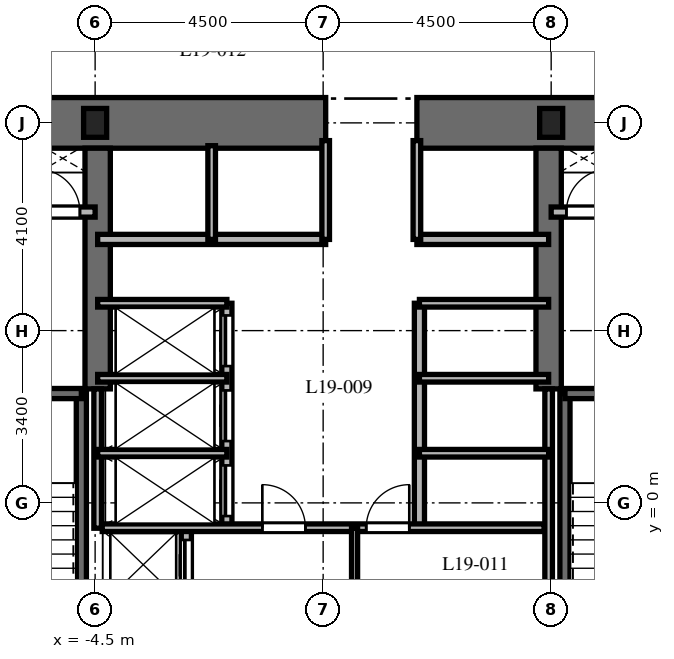
"""IFC4 building model, lengths in metres.
Left out: names, types, materials, properties, quantities, classifications, styles, units other than length and angle.
Written with IfcOpenShell. Run it as: python <this file> out.ifc"""

import sys

from ifc_helpers import new_model, si_unit, direction, frame, frame_2d, origin, origin_2d, place, context, subcontext, project, spatial, rectangle, i_section, extrude, element, fill, save


model = new_model("IFC4")
c1 = context("Model", 3, precision=1e-05, world=origin(), true_north=direction((0.0, 1.0)))
c2 = subcontext(c1, "Body", "Model", "MODEL_VIEW")
j1 = project(units=[si_unit("LENGTHUNIT", "METRE"), si_unit("PLANEANGLEUNIT", "RADIAN")], contexts=[c1])
p1 = place(None, origin())
s1 = spatial("IfcSite", under=j1, at=p1, CompositionType="ELEMENT")
p2 = place(p1, origin())
s2 = spatial("IfcBuilding", under=s1, at=p2, CompositionType="ELEMENT")
p3 = place(p2, frame((0.0, 0.0, 82.3)))
s3 = spatial("IfcBuildingStorey", under=s2, at=p3, CompositionType="ELEMENT", Elevation=82.3)
p4 = place(p3, frame((-9.5, 7.5, 0.0), z_axis=(0.0, 0.0, 1.0), x_axis=(1.0, 0.0, 0.0)))
e1 = element("IfcWall", 1, at=p4, inside=s3, PredefinedType="SHEAR", context=c2, shape_type="SweptSolid", body=[
    extrude(rectangle(XDim=9.55, YDim=1.0, at=frame_2d((4.775, 0.0))), origin(), (0.0, 0.0, 1.0), 3.7),
])
p5 = place(p3, frame((1.85, 7.5, 0.0), z_axis=(0.0, 0.0, 1.0), x_axis=(1.0, 0.0, 0.0)))
e2 = element("IfcWall", 2, at=p5, inside=s3, PredefinedType="SHEAR", context=c2, shape_type="SweptSolid", body=[
    extrude(rectangle(XDim=7.65, YDim=1.0, at=frame_2d((3.825, 0.0))), origin(), (0.0, 0.0, 1.0), 3.7),
])
for number, where, z_axis, x_axis in (
    (3, (-4.45, 2.25, 0.0), (0.0, 0.0, 1.0), (0.0, 1.0, 0.0)),
    (4, (4.45, 2.25, 0.0), (0.0, 0.0, 1.0), (0.0, 1.0, 0.0)),
):
    element("IfcWall", number, at=place(p3, frame(where, z_axis=z_axis, x_axis=x_axis)), inside=s3, PredefinedType="SHEAR", context=c2, shape_type="SweptSolid", body=[
        extrude(rectangle(XDim=4.75, YDim=0.5, at=frame_2d((2.375, 0.0))), origin(), (0.0, 0.0, 1.0), 3.7),
    ])
p6 = place(p3, frame((-4.772, -6.985, 0.0), z_axis=(0.0, 0.0, 1.0), x_axis=(0.0, 1.0, 0.0)))
e5 = element("IfcWall", 5, at=p6, inside=s3, PredefinedType="SHEAR", context=c2, shape_type="SweptSolid", body=[
    extrude(rectangle(XDim=9.143, YDim=0.2, at=frame_2d((4.572, 0.0))), origin(), (0.0, 0.0, 1.0), 3.7),
])
p7 = place(p3, frame((-8.458, 2.158, 0.0), z_axis=(0.0, 0.0, 1.0), x_axis=(1.0, 0.0, 0.0)))
e6 = element("IfcWall", 6, at=p7, inside=s3, PredefinedType="SHEAR", context=c2, shape_type="SweptSolid", body=[
    extrude(rectangle(XDim=3.686, YDim=0.2, at=frame_2d((1.843, 0.0))), origin(), (0.0, 0.0, 1.0), 3.7),
])
p8 = place(p7, frame((1.3, 0.0, 0.0)))
e7 = element("IfcOpeningElement", 7, at=p8, cuts=e6, PredefinedType="OPENING", context=c2, shape_type="SweptSolid", body=[
    extrude(rectangle(XDim=1.0, YDim=2.15, at=frame_2d((0.5, 1.075))), frame((0.0, 0.11, 0.0), z_axis=(0.0, -1.0, 0.0), x_axis=(1.0, 0.0, 0.0)), (0.0, 0.0, 1.0), 0.22),
])
p9 = place(p3, frame((4.772, -6.985, 0.0), z_axis=(0.0, 0.0, 1.0), x_axis=(0.0, 1.0, 0.0)))
e8 = element("IfcWall", 8, at=p9, inside=s3, PredefinedType="SHEAR", context=c2, shape_type="SweptSolid", body=[
    extrude(rectangle(XDim=9.143, YDim=0.2, at=frame_2d((4.572, 0.0))), origin(), (0.0, 0.0, 1.0), 3.7),
])
p10 = place(p3, frame((4.772, 2.158, 0.0), z_axis=(0.0, 0.0, 1.0), x_axis=(1.0, 0.0, 0.0)))
e9 = element("IfcWall", 9, at=p10, inside=s3, PredefinedType="SHEAR", context=c2, shape_type="SweptSolid", body=[
    extrude(rectangle(XDim=3.686, YDim=0.2, at=frame_2d((1.843, 0.0))), origin(), (0.0, 0.0, 1.0), 3.7),
])
p11 = place(p10, frame((1.35, 0.0, 0.0)))
e10 = element("IfcOpeningElement", 10, at=p11, cuts=e9, PredefinedType="OPENING", context=c2, shape_type="SweptSolid", body=[
    extrude(rectangle(XDim=1.0, YDim=2.15, at=frame_2d((0.5, 1.075))), frame((0.0, 0.11, 0.0), z_axis=(0.0, -1.0, 0.0), x_axis=(1.0, 0.0, 0.0)), (0.0, 0.0, 1.0), 0.22),
])
for number, where, z_axis, x_axis in (
    (11, (4.5, 7.5, 0.0), (0.0, 0.0, 1.0), (1.0, 0.0, 0.0)),
    (12, (-4.5, 7.5, 0.0), (0.0, 0.0, 1.0), (1.0, 0.0, 0.0)),
):
    element("IfcColumn", number, at=place(p3, frame(where, z_axis=z_axis, x_axis=x_axis)), inside=s3, PredefinedType="COLUMN", context=c2, shape_type="SweptSolid", body=[
        extrude(i_section(OverallWidth=0.454, OverallDepth=0.569, WebThickness=0.078, FlangeThickness=0.125, at=origin_2d()), origin(), (0.0, 0.0, 1.0), 3.7),
    ])
p12 = place(p3, frame((-8.55, 5.74, 0.0), z_axis=(0.0, 0.0, 1.0), x_axis=(1.0, 0.0, 0.0)))
e13 = element("IfcWall", 13, at=p12, inside=s3, PredefinedType="PARTITIONING", context=c2, shape_type="SweptSolid", body=[
    extrude(rectangle(XDim=4.05, YDim=0.2, at=frame_2d((2.025, 0.0))), origin(), (0.0, 0.0, 1.0), 3.38),
])
p13 = place(p12, frame((0.75, 0.0, 0.0)))
e14 = element("IfcOpeningElement", 14, at=p13, cuts=e13, PredefinedType="OPENING", context=c2, shape_type="SweptSolid", body=[
    extrude(rectangle(XDim=1.1, YDim=2.2, at=frame_2d((0.55, 1.1))), frame((0.0, 0.11, 0.0), z_axis=(0.0, -1.0, 0.0), x_axis=(1.0, 0.0, 0.0)), (0.0, 0.0, 1.0), 0.22),
])
p14 = place(p12, frame((2.9, 0.0, 0.0)))
e15 = element("IfcOpeningElement", 15, at=p14, cuts=e13, PredefinedType="OPENING", context=c2, shape_type="SweptSolid", body=[
    extrude(rectangle(XDim=0.85, YDim=2.03, at=frame_2d((0.425, 1.015))), frame((0.0, 0.11, 0.0), z_axis=(0.0, -1.0, 0.0), x_axis=(1.0, 0.0, 0.0)), (0.0, 0.0, 1.0), 0.22),
])
p15 = place(p3, frame((4.5, 5.74, 0.0), z_axis=(0.0, 0.0, 1.0), x_axis=(1.0, 0.0, 0.0)))
e16 = element("IfcWall", 16, at=p15, inside=s3, PredefinedType="PARTITIONING", context=c2, shape_type="SweptSolid", body=[
    extrude(rectangle(XDim=4.05, YDim=0.2, at=frame_2d((2.025, 0.0))), origin(), (0.0, 0.0, 1.0), 3.38),
])
p16 = place(p15, frame((0.3, 0.0, 0.0)))
e17 = element("IfcOpeningElement", 17, at=p16, cuts=e16, PredefinedType="OPENING", context=c2, shape_type="SweptSolid", body=[
    extrude(rectangle(XDim=0.85, YDim=2.03, at=frame_2d((0.425, 1.015))), frame((0.0, 0.11, 0.0), z_axis=(0.0, -1.0, 0.0), x_axis=(1.0, 0.0, 0.0)), (0.0, 0.0, 1.0), 0.22),
])
p17 = place(p15, frame((2.15, 0.0, 0.0)))
e18 = element("IfcOpeningElement", 18, at=p17, cuts=e16, PredefinedType="OPENING", context=c2, shape_type="SweptSolid", body=[
    extrude(rectangle(XDim=1.1, YDim=2.2, at=frame_2d((0.55, 1.1))), frame((0.0, 0.11, 0.0), z_axis=(0.0, -1.0, 0.0), x_axis=(1.0, 0.0, 0.0)), (0.0, 0.0, 1.0), 0.22),
])
p18 = place(p3, frame((-2.7, -1.972, 0.0), z_axis=(0.0, 0.0, 1.0), x_axis=(0.0, 1.0, 0.0)))
e19 = element("IfcWall", 19, at=p18, inside=s3, PredefinedType="PARTITIONING", context=c2, shape_type="SweptSolid", body=[
    extrude(rectangle(XDim=1.472, YDim=0.2, at=frame_2d((0.736, 0.0))), origin(), (0.0, 0.0, 1.0), 3.38),
])
p19 = place(p18, frame((0.24, 0.0, 0.0)))
e20 = element("IfcOpeningElement", 20, at=p19, cuts=e19, PredefinedType="OPENING", context=c2, shape_type="SweptSolid", body=[
    extrude(rectangle(XDim=1.0, YDim=2.2, at=frame_2d((0.5, 1.1))), frame((0.0, 0.11, 0.0), z_axis=(0.0, -1.0, 0.0), x_axis=(1.0, 0.0, 0.0)), (0.0, 0.0, 1.0), 0.22),
])
p20 = place(p3, frame((-4.45, 5.2, 0.0), z_axis=(0.0, 0.0, 1.0), x_axis=(1.0, 0.0, 0.0)))
e21 = element("IfcWall", 21, at=p20, inside=s3, PredefinedType="PARTITIONING", context=c2, shape_type="SweptSolid", body=[
    extrude(rectangle(XDim=4.5, YDim=0.2, at=frame_2d((2.25, 0.0))), origin(), (0.0, 0.0, 1.0), 3.38),
])
p21 = place(p3, frame((1.85, 5.2, 0.0), z_axis=(0.0, 0.0, 1.0), x_axis=(1.0, 0.0, 0.0)))
e22 = element("IfcWall", 22, at=p21, inside=s3, PredefinedType="PARTITIONING", context=c2, shape_type="SweptSolid", body=[
    extrude(rectangle(XDim=2.6, YDim=0.2, at=frame_2d((1.3, 0.0))), origin(), (0.0, 0.0, 1.0), 3.38),
])
p22 = place(p3, frame((-2.2, 5.2, 0.0), z_axis=(0.0, 0.0, 1.0), x_axis=(0.0, 1.0, 0.0)))
e23 = element("IfcWall", 23, at=p22, inside=s3, PredefinedType="PARTITIONING", context=c2, shape_type="SweptSolid", body=[
    extrude(rectangle(XDim=1.85, YDim=0.15, at=frame_2d((0.925, 0.0))), origin(), (0.0, 0.0, 1.0), 3.38),
])
for number, where, z_axis, x_axis in (
    (24, (0.05, 5.2, 0.0), (0.0, 0.0, 1.0), (0.0, 1.0, 0.0)),
    (25, (1.85, 5.2, 0.0), (0.0, 0.0, 1.0), (0.0, 1.0, 0.0)),
):
    element("IfcWall", number, at=place(p3, frame(where, z_axis=z_axis, x_axis=x_axis)), inside=s3, PredefinedType="PARTITIONING", context=c2, shape_type="SweptSolid", body=[
        extrude(rectangle(XDim=1.95, YDim=0.15, at=frame_2d((0.975, 0.0))), origin(), (0.0, 0.0, 1.0), 3.38),
    ])
p23 = place(p3, frame((-4.45, -0.5, 0.0), z_axis=(0.0, 0.0, 1.0), x_axis=(0.0, 1.0, 0.0)))
e26 = element("IfcWall", 26, at=p23, inside=s3, PredefinedType="PARTITIONING", context=c2, shape_type="SweptSolid", body=[
    extrude(rectangle(XDim=2.75, YDim=0.15, at=frame_2d((1.375, 0.0))), origin(), (0.0, 0.0, 1.0), 3.38),
])
p24 = place(p3, frame((4.45, -1.972, 0.0), z_axis=(0.0, 0.0, 1.0), x_axis=(0.0, 1.0, 0.0)))
e27 = element("IfcWall", 27, at=p24, inside=s3, PredefinedType="PARTITIONING", context=c2, shape_type="SweptSolid", body=[
    extrude(rectangle(XDim=4.222, YDim=0.15, at=frame_2d((2.111, 0.0))), origin(), (0.0, 0.0, 1.0), 3.38),
])
p25 = place(p3, frame((-1.9, -0.5, 0.0), z_axis=(0.0, 0.0, 1.0), x_axis=(0.0, 1.0, 0.0)))
e28 = element("IfcWall", 28, at=p25, inside=s3, PredefinedType="PARTITIONING", context=c2, shape_type="SweptSolid", body=[
    extrude(rectangle(XDim=4.44, YDim=0.2, at=frame_2d((2.22, 0.0))), origin(), (0.0, 0.0, 1.0), 3.38),
])
p26 = place(p25, frame((0.24, 0.0, 0.0)))
e29 = element("IfcOpeningElement", 29, at=p26, cuts=e28, PredefinedType="OPENING", context=c2, shape_type="SweptSolid", body=[
    extrude(rectangle(XDim=1.0, YDim=2.2, at=frame_2d((0.5, 1.1))), frame((0.0, 0.11, 0.0), z_axis=(0.0, -1.0, 0.0), x_axis=(1.0, 0.0, 0.0)), (0.0, 0.0, 1.0), 0.22),
])
p27 = place(p25, frame((1.72, 0.0, 0.0)))
e30 = element("IfcOpeningElement", 30, at=p27, cuts=e28, PredefinedType="OPENING", context=c2, shape_type="SweptSolid", body=[
    extrude(rectangle(XDim=1.0, YDim=2.2, at=frame_2d((0.5, 1.1))), frame((0.0, 0.11, 0.0), z_axis=(0.0, -1.0, 0.0), x_axis=(1.0, 0.0, 0.0)), (0.0, 0.0, 1.0), 0.22),
])
p28 = place(p25, frame((3.2, 0.0, 0.0)))
e31 = element("IfcOpeningElement", 31, at=p28, cuts=e28, PredefinedType="OPENING", context=c2, shape_type="SweptSolid", body=[
    extrude(rectangle(XDim=1.0, YDim=2.2, at=frame_2d((0.5, 1.1))), frame((0.0, 0.11, 0.0), z_axis=(0.0, -1.0, 0.0), x_axis=(1.0, 0.0, 0.0)), (0.0, 0.0, 1.0), 0.22),
])
for number, where, z_axis, x_axis in (
    (32, (-4.45, 3.94, 0.0), (0.0, 0.0, 1.0), (1.0, 0.0, 0.0)),
    (33, (-4.45, 0.98, 0.0), (0.0, 0.0, 1.0), (1.0, 0.0, 0.0)),
    (34, (-4.45, 2.46, 0.0), (0.0, 0.0, 1.0), (1.0, 0.0, 0.0)),
):
    element("IfcWall", number, at=place(p3, frame(where, z_axis=z_axis, x_axis=x_axis)), inside=s3, PredefinedType="PARTITIONING", context=c2, shape_type="SweptSolid", body=[
        extrude(rectangle(XDim=2.55, YDim=0.15, at=frame_2d((1.275, 0.0))), origin(), (0.0, 0.0, 1.0), 3.38),
    ])
p29 = place(p3, frame((1.9, -0.5, 0.0), z_axis=(0.0, 0.0, 1.0), x_axis=(0.0, 1.0, 0.0)))
e35 = element("IfcWall", 35, at=p29, inside=s3, PredefinedType="PARTITIONING", context=c2, shape_type="SweptSolid", body=[
    extrude(rectangle(XDim=4.44, YDim=0.2, at=frame_2d((2.22, 0.0))), origin(), (0.0, 0.0, 1.0), 3.38),
])
for number, where, z_axis, x_axis in (
    (36, (1.9, 3.94, 0.0), (0.0, 0.0, 1.0), (1.0, 0.0, 0.0)),
    (37, (1.9, 0.98, 0.0), (0.0, 0.0, 1.0), (1.0, 0.0, 0.0)),
    (38, (1.9, 2.46, 0.0), (0.0, 0.0, 1.0), (1.0, 0.0, 0.0)),
):
    element("IfcWall", number, at=place(p3, frame(where, z_axis=z_axis, x_axis=x_axis)), inside=s3, PredefinedType="PARTITIONING", context=c2, shape_type="SweptSolid", body=[
        extrude(rectangle(XDim=2.55, YDim=0.15, at=frame_2d((1.275, 0.0))), origin(), (0.0, 0.0, 1.0), 3.38),
    ])
p30 = place(p3, frame((-4.36, -0.49, 0.0), z_axis=(0.0, 0.0, 1.0), x_axis=(1.0, 0.0, 0.0)))
e39 = element("IfcWall", 39, at=p30, inside=s3, PredefinedType="PARTITIONING", context=c2, shape_type="SweptSolid", body=[
    extrude(rectangle(XDim=8.72, YDim=0.15, at=frame_2d((4.36, 0.0))), origin(), (0.0, 0.0, 1.0), 3.38),
])
p31 = place(p30, frame((3.16, 0.0, 0.0)))
e40 = element("IfcOpeningElement", 40, at=p31, cuts=e39, PredefinedType="OPENING", context=c2, shape_type="SweptSolid", body=[
    extrude(rectangle(XDim=0.85, YDim=2.03, at=frame_2d((0.425, 1.015))), frame((0.0, 0.085, 0.0), z_axis=(0.0, -1.0, 0.0), x_axis=(1.0, 0.0, 0.0)), (0.0, 0.0, 1.0), 0.17),
])
p32 = place(p30, frame((5.21, 0.0, 0.0)))
e41 = element("IfcOpeningElement", 41, at=p32, cuts=e39, PredefinedType="OPENING", context=c2, shape_type="SweptSolid", body=[
    extrude(rectangle(XDim=0.85, YDim=2.03, at=frame_2d((0.425, 1.015))), frame((0.0, 0.085, 0.0), z_axis=(0.0, -1.0, 0.0), x_axis=(1.0, 0.0, 0.0)), (0.0, 0.0, 1.0), 0.17),
])
p33 = place(p3, frame((0.62, -1.972, 0.0), z_axis=(0.0, 0.0, 1.0), x_axis=(0.0, 1.0, 0.0)))
e42 = element("IfcWall", 42, at=p33, inside=s3, PredefinedType="PARTITIONING", context=c2, shape_type="SweptSolid", body=[
    extrude(rectangle(XDim=1.472, YDim=0.12, at=frame_2d((0.736, 0.0))), origin(), (0.0, 0.0, 1.0), 3.38),
])
p34 = place(p14, origin())
e43 = element("IfcDoor", 43, at=p34, inside=s3, OperationType="SINGLE_SWING_LEFT", PredefinedType="DOOR", context=c2, shape_type="SweptSolid", body=[
    extrude(rectangle(XDim=0.85, YDim=2.03, at=frame_2d((0.425, 1.015))), frame((0.0, 0.025, 0.0), z_axis=(0.0, -1.0, 0.0), x_axis=(1.0, 0.0, 0.0)), (0.0, 0.0, 1.0), 0.05),
])
fill(e15, e43)
p35 = place(p16, origin())
e44 = element("IfcDoor", 44, at=p35, inside=s3, OperationType="SINGLE_SWING_RIGHT", PredefinedType="DOOR", context=c2, shape_type="SweptSolid", body=[
    extrude(rectangle(XDim=0.85, YDim=2.03, at=frame_2d((0.425, 1.015))), frame((0.0, 0.025, 0.0), z_axis=(0.0, -1.0, 0.0), x_axis=(1.0, 0.0, 0.0)), (0.0, 0.0, 1.0), 0.05),
])
fill(e17, e44)
p36 = place(p19, origin())
e45 = element("IfcDoor", 45, at=p36, inside=s3, OperationType="SLIDING_TO_LEFT", PredefinedType="DOOR", context=c2, shape_type="SweptSolid", body=[
    extrude(rectangle(XDim=1.0, YDim=2.2, at=frame_2d((0.5, 1.1))), frame((0.0, 0.025, 0.0), z_axis=(0.0, -1.0, 0.0), x_axis=(1.0, 0.0, 0.0)), (0.0, 0.0, 1.0), 0.05),
])
fill(e20, e45)
p37 = place(p26, origin())
e46 = element("IfcDoor", 46, at=p37, inside=s3, OperationType="SLIDING_TO_LEFT", PredefinedType="DOOR", context=c2, shape_type="SweptSolid", body=[
    extrude(rectangle(XDim=1.0, YDim=2.2, at=frame_2d((0.5, 1.1))), frame((0.0, 0.025, 0.0), z_axis=(0.0, -1.0, 0.0), x_axis=(1.0, 0.0, 0.0)), (0.0, 0.0, 1.0), 0.05),
])
fill(e29, e46)
p38 = place(p27, origin())
e47 = element("IfcDoor", 47, at=p38, inside=s3, OperationType="SLIDING_TO_LEFT", PredefinedType="DOOR", context=c2, shape_type="SweptSolid", body=[
    extrude(rectangle(XDim=1.0, YDim=2.2, at=frame_2d((0.5, 1.1))), frame((0.0, 0.025, 0.0), z_axis=(0.0, -1.0, 0.0), x_axis=(1.0, 0.0, 0.0)), (0.0, 0.0, 1.0), 0.05),
])
fill(e30, e47)
p39 = place(p28, origin())
e48 = element("IfcDoor", 48, at=p39, inside=s3, OperationType="SLIDING_TO_LEFT", PredefinedType="DOOR", context=c2, shape_type="SweptSolid", body=[
    extrude(rectangle(XDim=1.0, YDim=2.2, at=frame_2d((0.5, 1.1))), frame((0.0, 0.025, 0.0), z_axis=(0.0, -1.0, 0.0), x_axis=(1.0, 0.0, 0.0)), (0.0, 0.0, 1.0), 0.05),
])
fill(e31, e48)
p40 = place(p31, origin())
e49 = element("IfcDoor", 49, at=p40, inside=s3, OperationType="SINGLE_SWING_LEFT", PredefinedType="DOOR", context=c2, shape_type="SweptSolid", body=[
    extrude(rectangle(XDim=0.85, YDim=2.03, at=frame_2d((0.425, 1.015))), frame((0.0, 0.025, 0.0), z_axis=(0.0, -1.0, 0.0), x_axis=(1.0, 0.0, 0.0)), (0.0, 0.0, 1.0), 0.05),
])
fill(e40, e49)
p41 = place(p32, origin())
e50 = element("IfcDoor", 50, at=p41, inside=s3, OperationType="SINGLE_SWING_RIGHT", PredefinedType="DOOR", context=c2, shape_type="SweptSolid", body=[
    extrude(rectangle(XDim=0.85, YDim=2.03, at=frame_2d((0.425, 1.015))), frame((0.0, 0.025, 0.0), z_axis=(0.0, -1.0, 0.0), x_axis=(1.0, 0.0, 0.0)), (0.0, 0.0, 1.0), 0.05),
])
fill(e41, e50)
save(model, sys.argv[1])
